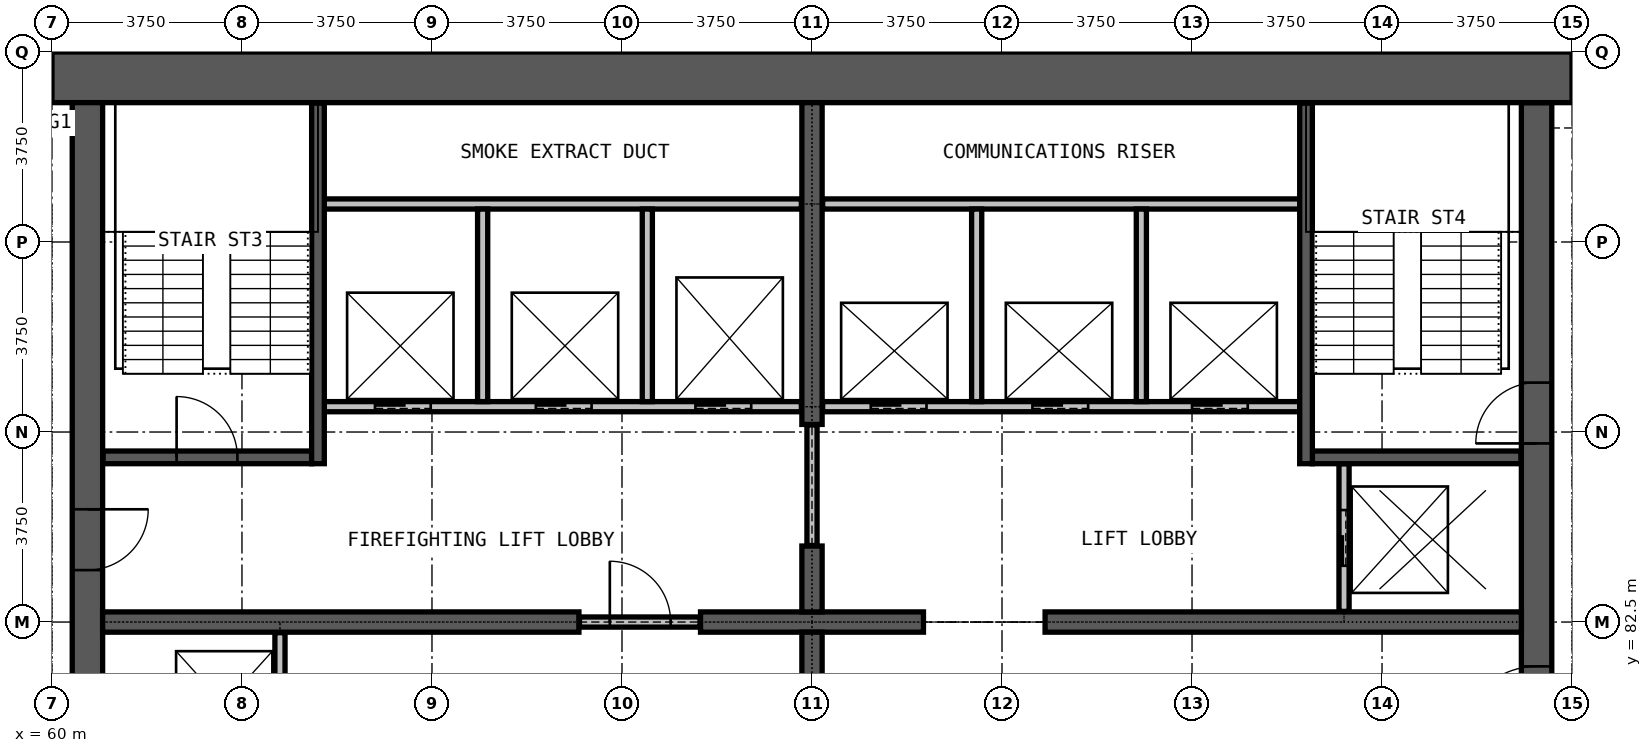
"""IFC4 building model, lengths in metres.
Left out: names, types, materials, properties, quantities, classifications, styles, units other than length and angle.
Written with IfcOpenShell. Run it as: python <this file> out.ifc"""

import sys

from ifc_helpers import new_model, si_unit, direction, frame, frame_2d, origin, place, context, subcontext, project, spatial, rectangle, extrude, element, fill, save


model = new_model("IFC4")
c1 = context("Model", 3, precision=1e-05, world=origin(), true_north=direction((0.0, 1.0)))
c2 = subcontext(c1, "Body", "Model", "MODEL_VIEW")
j1 = project(units=[si_unit("LENGTHUNIT", "METRE"), si_unit("PLANEANGLEUNIT", "RADIAN")], contexts=[c1])
p1 = place(None, origin())
s1 = spatial("IfcSite", under=j1, at=p1, CompositionType="ELEMENT")
p2 = place(p1, origin())
s2 = spatial("IfcBuilding", under=s1, at=p2, CompositionType="ELEMENT")
p3 = place(p2, frame((0.0, 0.0, 224.7)))
s3 = spatial("IfcBuildingStorey", under=s2, at=p3, CompositionType="ELEMENT", Elevation=224.7)
p4 = place(p3, frame((89.3, 72.25, 0.0), z_axis=(0.0, 0.0, 1.0), x_axis=(0.0, 1.0, 0.0)))
e1 = element("IfcWall", 1, at=p4, inside=s3, PredefinedType="SHEAR", context=c2, shape_type="SweptSolid", body=[
    extrude(rectangle(XDim=20.5, YDim=0.6, at=frame_2d((10.25, 0.0))), origin(), (0.0, 0.0, 1.0), 3.6),
])
p5 = place(p4, frame((0.275, 0.0, 0.0)))
e2 = element("IfcOpeningElement", 2, at=p5, cuts=e1, PredefinedType="OPENING", context=c2, shape_type="SweptSolid", body=[
    extrude(rectangle(XDim=1.2, YDim=2.2, at=frame_2d((0.6, 1.1))), frame((0.0, 0.31, 0.0), z_axis=(0.0, -1.0, 0.0), x_axis=(1.0, 0.0, 0.0)), (0.0, 0.0, 1.0), 0.62),
])
p6 = place(p4, frame((13.775, 0.0, 0.0)))
e3 = element("IfcOpeningElement", 3, at=p6, cuts=e1, PredefinedType="OPENING", context=c2, shape_type="SweptSolid", body=[
    extrude(rectangle(XDim=1.2, YDim=2.2, at=frame_2d((0.6, 1.1))), frame((0.0, 0.31, 0.0), z_axis=(0.0, -1.0, 0.0), x_axis=(1.0, 0.0, 0.0)), (0.0, 0.0, 1.0), 0.62),
])
p7 = place(p4, frame((7.875, 0.0, 0.0)))
e4 = element("IfcOpeningElement", 4, at=p7, cuts=e1, PredefinedType="OPENING", context=c2, shape_type="SweptSolid", body=[
    extrude(rectangle(XDim=1.5, YDim=2.2, at=frame_2d((0.75, 1.1))), frame((0.0, 0.31, 0.0), z_axis=(0.0, -1.0, 0.0), x_axis=(1.0, 0.0, 0.0)), (0.0, 0.0, 1.0), 0.62),
])
p8 = place(p3, frame((90.0, 93.25, 0.0), z_axis=(0.0, 0.0, 1.0), x_axis=(-1.0, 0.0, 0.0)))
e5 = element("IfcWall", 5, at=p8, inside=s3, PredefinedType="SHEAR", context=c2, shape_type="SweptSolid", body=[
    extrude(rectangle(XDim=30.0, YDim=1.0, at=frame_2d((15.0, 0.0))), origin(), (0.0, 0.0, 1.0), 3.6),
])
p9 = place(p3, frame((60.7, 92.75, 0.0), z_axis=(0.0, 0.0, 1.0), x_axis=(0.0, -1.0, 0.0)))
e6 = element("IfcWall", 6, at=p9, inside=s3, PredefinedType="SHEAR", context=c2, shape_type="SweptSolid", body=[
    extrude(rectangle(XDim=20.5, YDim=0.6, at=frame_2d((10.25, 0.0))), origin(), (0.0, 0.0, 1.0), 3.6),
])
p10 = place(p9, frame((19.025, 0.0, 0.0)))
e7 = element("IfcOpeningElement", 7, at=p10, cuts=e6, PredefinedType="OPENING", context=c2, shape_type="SweptSolid", body=[
    extrude(rectangle(XDim=1.2, YDim=2.2, at=frame_2d((0.6, 1.1))), frame((0.0, 0.31, 0.0), z_axis=(0.0, -1.0, 0.0), x_axis=(1.0, 0.0, 0.0)), (0.0, 0.0, 1.0), 0.62),
])
p11 = place(p9, frame((8.025, 0.0, 0.0)))
e8 = element("IfcOpeningElement", 8, at=p11, cuts=e6, PredefinedType="OPENING", context=c2, shape_type="SweptSolid", body=[
    extrude(rectangle(XDim=1.2, YDim=2.2, at=frame_2d((0.6, 1.1))), frame((0.0, 0.31, 0.0), z_axis=(0.0, -1.0, 0.0), x_axis=(1.0, 0.0, 0.0)), (0.0, 0.0, 1.0), 0.62),
])
p12 = place(p3, frame((61.0, 82.5, 0.0), z_axis=(0.0, 0.0, 1.0), x_axis=(1.0, 0.0, 0.0)))
e9 = element("IfcWall", 9, at=p12, inside=s3, PredefinedType="SHEAR", context=c2, shape_type="SweptSolid", body=[
    extrude(rectangle(XDim=9.4, YDim=0.4, at=frame_2d((4.7, 0.0))), origin(), (0.0, 0.0, 1.0), 3.6),
])
p13 = place(p3, frame((72.8, 82.5, 0.0), z_axis=(0.0, 0.0, 1.0), x_axis=(1.0, 0.0, 0.0)))
e10 = element("IfcWall", 10, at=p13, inside=s3, PredefinedType="SHEAR", context=c2, shape_type="SweptSolid", body=[
    extrude(rectangle(XDim=4.4, YDim=0.4, at=frame_2d((2.2, 0.0))), origin(), (0.0, 0.0, 1.0), 3.6),
])
p14 = place(p3, frame((79.6, 82.5, 0.0), z_axis=(0.0, 0.0, 1.0), x_axis=(1.0, 0.0, 0.0)))
e11 = element("IfcWall", 11, at=p14, inside=s3, PredefinedType="SHEAR", context=c2, shape_type="SweptSolid", body=[
    extrude(rectangle(XDim=9.4, YDim=0.4, at=frame_2d((4.7, 0.0))), origin(), (0.0, 0.0, 1.0), 3.6),
])
for number, where, z_axis, x_axis in (
    (12, (75.0, 81.0, 0.0), (0.0, 0.0, 1.0), (0.0, 1.0, 0.0)),
    (13, (75.0, 82.7, 0.0), (0.0, 0.0, 1.0), (0.0, 1.0, 0.0)),
):
    element("IfcWall", number, at=place(p3, frame(where, z_axis=z_axis, x_axis=x_axis)), inside=s3, PredefinedType="SHEAR", context=c2, shape_type="SweptSolid", body=[
        extrude(rectangle(XDim=1.3, YDim=0.4, at=frame_2d((0.65, 0.0))), origin(), (0.0, 0.0, 1.0), 3.6),
    ])
p15 = place(p3, frame((75.0, 86.4, 0.0), z_axis=(0.0, 0.0, 1.0), x_axis=(0.0, 1.0, 0.0)))
e14 = element("IfcWall", 14, at=p15, inside=s3, PredefinedType="SHEAR", context=c2, shape_type="SweptSolid", body=[
    extrude(rectangle(XDim=6.35, YDim=0.4, at=frame_2d((3.175, 0.0))), origin(), (0.0, 0.0, 1.0), 3.6),
])
p16 = place(p3, frame((70.41, 82.5, 0.0), z_axis=(0.0, 0.0, 1.0), x_axis=(1.0, 0.0, 0.0)))
e15 = element("IfcWall", 15, at=p16, inside=s3, PredefinedType="PARTITIONING", context=c2, shape_type="SweptSolid", body=[
    extrude(rectangle(XDim=2.38, YDim=0.2, at=frame_2d((1.19, 0.0))), origin(), (0.0, 0.0, 1.0), 2.4),
])
p17 = place(p16, frame((0.6, 0.0, 0.0)))
e16 = element("IfcOpeningElement", 16, at=p17, cuts=e15, PredefinedType="OPENING", context=c2, shape_type="SweptSolid", body=[
    extrude(rectangle(XDim=1.2, YDim=2.2, at=frame_2d((0.6, 1.1))), frame((0.0, 0.11, 0.0), z_axis=(0.0, -1.0, 0.0), x_axis=(1.0, 0.0, 0.0)), (0.0, 0.0, 1.0), 0.22),
])
p18 = place(p3, frame((75.0, 84.01, 0.0), z_axis=(0.0, 0.0, 1.0), x_axis=(0.0, 1.0, 0.0)))
e17 = element("IfcWall", 17, at=p18, inside=s3, PredefinedType="PARTITIONING", context=c2, shape_type="SweptSolid", body=[
    extrude(rectangle(XDim=2.38, YDim=0.2, at=frame_2d((1.19, 0.0))), origin(), (0.0, 0.0, 1.0), 2.4),
])
p19 = place(p3, frame((65.375, 86.75, 0.0), z_axis=(0.0, 0.0, 1.0), x_axis=(1.0, 0.0, 0.0)))
e18 = element("IfcWall", 18, at=p19, inside=s3, PredefinedType="PARTITIONING", context=c2, shape_type="SweptSolid", body=[
    extrude(rectangle(XDim=9.415, YDim=0.2, at=frame_2d((4.708, 0.0))), origin(), (0.0, 0.0, 1.0), 3.3),
])
p20 = place(p19, frame((1.0, 0.0, 0.0)))
e19 = element("IfcOpeningElement", 19, at=p20, cuts=e18, PredefinedType="OPENING", context=c2, shape_type="SweptSolid", body=[
    extrude(rectangle(XDim=1.1, YDim=2.2, at=frame_2d((0.55, 1.1))), frame((0.0, 0.11, 0.0), z_axis=(0.0, -1.0, 0.0), x_axis=(1.0, 0.0, 0.0)), (0.0, 0.0, 1.0), 0.22),
])
p21 = place(p19, frame((4.175, 0.0, 0.0)))
e20 = element("IfcOpeningElement", 20, at=p21, cuts=e18, PredefinedType="OPENING", context=c2, shape_type="SweptSolid", body=[
    extrude(rectangle(XDim=1.1, YDim=2.2, at=frame_2d((0.55, 1.1))), frame((0.0, 0.11, 0.0), z_axis=(0.0, -1.0, 0.0), x_axis=(1.0, 0.0, 0.0)), (0.0, 0.0, 1.0), 0.22),
])
p22 = place(p19, frame((7.325, 0.0, 0.0)))
e21 = element("IfcOpeningElement", 21, at=p22, cuts=e18, PredefinedType="OPENING", context=c2, shape_type="SweptSolid", body=[
    extrude(rectangle(XDim=1.1, YDim=2.2, at=frame_2d((0.55, 1.1))), frame((0.0, 0.11, 0.0), z_axis=(0.0, -1.0, 0.0), x_axis=(1.0, 0.0, 0.0)), (0.0, 0.0, 1.0), 0.22),
])
p23 = place(p3, frame((75.21, 86.75, 0.0), z_axis=(0.0, 0.0, 1.0), x_axis=(1.0, 0.0, 0.0)))
e22 = element("IfcWall", 22, at=p23, inside=s3, PredefinedType="PARTITIONING", context=c2, shape_type="SweptSolid", body=[
    extrude(rectangle(XDim=9.415, YDim=0.2, at=frame_2d((4.708, 0.0))), origin(), (0.0, 0.0, 1.0), 3.3),
])
p24 = place(p23, frame((0.95, 0.0, 0.0)))
e23 = element("IfcOpeningElement", 23, at=p24, cuts=e22, PredefinedType="OPENING", context=c2, shape_type="SweptSolid", body=[
    extrude(rectangle(XDim=1.1, YDim=2.2, at=frame_2d((0.55, 1.1))), frame((0.0, 0.11, 0.0), z_axis=(0.0, -1.0, 0.0), x_axis=(1.0, 0.0, 0.0)), (0.0, 0.0, 1.0), 0.22),
])
p25 = place(p23, frame((4.14, 0.0, 0.0)))
e24 = element("IfcOpeningElement", 24, at=p25, cuts=e22, PredefinedType="OPENING", context=c2, shape_type="SweptSolid", body=[
    extrude(rectangle(XDim=1.1, YDim=2.2, at=frame_2d((0.55, 1.1))), frame((0.0, 0.11, 0.0), z_axis=(0.0, -1.0, 0.0), x_axis=(1.0, 0.0, 0.0)), (0.0, 0.0, 1.0), 0.22),
])
p26 = place(p23, frame((7.29, 0.0, 0.0)))
e25 = element("IfcOpeningElement", 25, at=p26, cuts=e22, PredefinedType="OPENING", context=c2, shape_type="SweptSolid", body=[
    extrude(rectangle(XDim=1.1, YDim=2.2, at=frame_2d((0.55, 1.1))), frame((0.0, 0.11, 0.0), z_axis=(0.0, -1.0, 0.0), x_axis=(1.0, 0.0, 0.0)), (0.0, 0.0, 1.0), 0.22),
])
for number, where, z_axis, x_axis in (
    (26, (65.375, 90.75, 0.0), (0.0, 0.0, 1.0), (1.0, 0.0, 0.0)),
    (27, (75.21, 90.75, 0.0), (0.0, 0.0, 1.0), (1.0, 0.0, 0.0)),
):
    element("IfcWall", number, at=place(p3, frame(where, z_axis=z_axis, x_axis=x_axis)), inside=s3, PredefinedType="PARTITIONING", context=c2, shape_type="SweptSolid", body=[
        extrude(rectangle(XDim=9.415, YDim=0.2, at=frame_2d((4.708, 0.0))), origin(), (0.0, 0.0, 1.0), 3.3),
    ])
p27 = place(p3, frame((64.5, 79.375, 0.0), z_axis=(0.0, 0.0, 1.0), x_axis=(0.0, 1.0, 0.0)))
e28 = element("IfcWall", 28, at=p27, inside=s3, PredefinedType="PARTITIONING", context=c2, shape_type="SweptSolid", body=[
    extrude(rectangle(XDim=2.915, YDim=0.2, at=frame_2d((1.458, 0.0))), origin(), (0.0, 0.0, 1.0), 3.3),
])
for number, where, z_axis, x_axis in (
    (29, (68.5, 86.85, 0.0), (0.0, 0.0, 1.0), (0.0, 1.0, 0.0)),
    (30, (71.75, 86.85, 0.0), (0.0, 0.0, 1.0), (0.0, 1.0, 0.0)),
    (31, (78.25, 86.85, 0.0), (0.0, 0.0, 1.0), (0.0, 1.0, 0.0)),
    (32, (81.5, 86.85, 0.0), (0.0, 0.0, 1.0), (0.0, 1.0, 0.0)),
):
    element("IfcWall", number, at=place(p3, frame(where, z_axis=z_axis, x_axis=x_axis)), inside=s3, PredefinedType="PARTITIONING", context=c2, shape_type="SweptSolid", body=[
        extrude(rectangle(XDim=3.8, YDim=0.2, at=frame_2d((1.9, 0.0))), origin(), (0.0, 0.0, 1.0), 3.3),
    ])
p28 = place(p3, frame((85.5, 82.71, 0.0), z_axis=(0.0, 0.0, 1.0), x_axis=(0.0, 1.0, 0.0)))
e33 = element("IfcWall", 33, at=p28, inside=s3, PredefinedType="PARTITIONING", context=c2, shape_type="SweptSolid", body=[
    extrude(rectangle(XDim=2.915, YDim=0.2, at=frame_2d((1.458, 0.0))), origin(), (0.0, 0.0, 1.0), 3.3),
])
p29 = place(p28, frame((0.9, 0.0, 0.0)))
e34 = element("IfcOpeningElement", 34, at=p29, cuts=e33, PredefinedType="OPENING", context=c2, shape_type="SweptSolid", body=[
    extrude(rectangle(XDim=1.1, YDim=2.2, at=frame_2d((0.55, 1.1))), frame((0.0, 0.11, 0.0), z_axis=(0.0, -1.0, 0.0), x_axis=(1.0, 0.0, 0.0)), (0.0, 0.0, 1.0), 0.22),
])
p30 = place(p3, frame((61.01, 85.75, 0.0), z_axis=(0.0, 0.0, 1.0), x_axis=(1.0, 0.0, 0.0)))
e35 = element("IfcWall", 35, at=p30, inside=s3, PredefinedType="PARTITIONING", context=c2, shape_type="SweptSolid", body=[
    extrude(rectangle(XDim=4.115, YDim=0.25, at=frame_2d((2.058, 0.0))), origin(), (0.0, 0.0, 1.0), 3.3),
])
p31 = place(p30, frame((1.45, 0.0, 0.0)))
e36 = element("IfcOpeningElement", 36, at=p31, cuts=e35, PredefinedType="OPENING", context=c2, shape_type="SweptSolid", body=[
    extrude(rectangle(XDim=1.2, YDim=2.2, at=frame_2d((0.6, 1.1))), frame((0.0, 0.135, 0.0), z_axis=(0.0, -1.0, 0.0), x_axis=(1.0, 0.0, 0.0)), (0.0, 0.0, 1.0), 0.27),
])
p32 = place(p3, frame((84.875, 85.75, 0.0), z_axis=(0.0, 0.0, 1.0), x_axis=(1.0, 0.0, 0.0)))
e37 = element("IfcWall", 37, at=p32, inside=s3, PredefinedType="PARTITIONING", context=c2, shape_type="SweptSolid", body=[
    extrude(rectangle(XDim=4.115, YDim=0.25, at=frame_2d((2.058, 0.0))), origin(), (0.0, 0.0, 1.0), 3.3),
])
for number, where, z_axis, x_axis in (
    (38, (65.25, 85.625, 0.0), (0.0, 0.0, 1.0), (0.0, 1.0, 0.0)),
    (39, (84.75, 85.625, 0.0), (0.0, 0.0, 1.0), (0.0, 1.0, 0.0)),
):
    element("IfcWall", number, at=place(p3, frame(where, z_axis=z_axis, x_axis=x_axis)), inside=s3, PredefinedType="PARTITIONING", context=c2, shape_type="SweptSolid", body=[
        extrude(rectangle(XDim=7.115, YDim=0.25, at=frame_2d((3.558, 0.0))), origin(), (0.0, 0.0, 1.0), 3.3),
    ])
p33 = place(p24, origin())
e40 = element("IfcDoor", 40, at=p33, inside=s3, OperationType="DOUBLE_DOOR_SLIDING", PredefinedType="DOOR", context=c2, shape_type="SweptSolid", body=[
    extrude(rectangle(XDim=1.1, YDim=2.2, at=frame_2d((0.55, 1.1))), frame((0.0, 0.025, 0.0), z_axis=(0.0, -1.0, 0.0), x_axis=(1.0, 0.0, 0.0)), (0.0, 0.0, 1.0), 0.05),
])
fill(e23, e40)
p34 = place(p25, origin())
e41 = element("IfcDoor", 41, at=p34, inside=s3, OperationType="DOUBLE_DOOR_SLIDING", PredefinedType="DOOR", context=c2, shape_type="SweptSolid", body=[
    extrude(rectangle(XDim=1.1, YDim=2.2, at=frame_2d((0.55, 1.1))), frame((0.0, 0.025, 0.0), z_axis=(0.0, -1.0, 0.0), x_axis=(1.0, 0.0, 0.0)), (0.0, 0.0, 1.0), 0.05),
])
fill(e24, e41)
p35 = place(p26, origin())
e42 = element("IfcDoor", 42, at=p35, inside=s3, OperationType="DOUBLE_DOOR_SLIDING", PredefinedType="DOOR", context=c2, shape_type="SweptSolid", body=[
    extrude(rectangle(XDim=1.1, YDim=2.2, at=frame_2d((0.55, 1.1))), frame((0.0, 0.025, 0.0), z_axis=(0.0, -1.0, 0.0), x_axis=(1.0, 0.0, 0.0)), (0.0, 0.0, 1.0), 0.05),
])
fill(e25, e42)
p36 = place(p20, origin())
e43 = element("IfcDoor", 43, at=p36, inside=s3, OperationType="DOUBLE_DOOR_SLIDING", PredefinedType="DOOR", context=c2, shape_type="SweptSolid", body=[
    extrude(rectangle(XDim=1.1, YDim=2.2, at=frame_2d((0.55, 1.1))), frame((0.0, 0.025, 0.0), z_axis=(0.0, -1.0, 0.0), x_axis=(1.0, 0.0, 0.0)), (0.0, 0.0, 1.0), 0.05),
])
fill(e19, e43)
p37 = place(p21, origin())
e44 = element("IfcDoor", 44, at=p37, inside=s3, OperationType="DOUBLE_DOOR_SLIDING", PredefinedType="DOOR", context=c2, shape_type="SweptSolid", body=[
    extrude(rectangle(XDim=1.1, YDim=2.2, at=frame_2d((0.55, 1.1))), frame((0.0, 0.025, 0.0), z_axis=(0.0, -1.0, 0.0), x_axis=(1.0, 0.0, 0.0)), (0.0, 0.0, 1.0), 0.05),
])
fill(e20, e44)
p38 = place(p22, origin())
e45 = element("IfcDoor", 45, at=p38, inside=s3, OperationType="DOUBLE_DOOR_SLIDING", PredefinedType="DOOR", context=c2, shape_type="SweptSolid", body=[
    extrude(rectangle(XDim=1.1, YDim=2.2, at=frame_2d((0.55, 1.1))), frame((0.0, 0.025, 0.0), z_axis=(0.0, -1.0, 0.0), x_axis=(1.0, 0.0, 0.0)), (0.0, 0.0, 1.0), 0.05),
])
fill(e21, e45)
p39 = place(p29, origin())
e46 = element("IfcDoor", 46, at=p39, inside=s3, OperationType="DOUBLE_DOOR_SLIDING", PredefinedType="DOOR", context=c2, shape_type="SweptSolid", body=[
    extrude(rectangle(XDim=1.1, YDim=2.2, at=frame_2d((0.55, 1.1))), frame((0.0, 0.025, 0.0), z_axis=(0.0, -1.0, 0.0), x_axis=(1.0, 0.0, 0.0)), (0.0, 0.0, 1.0), 0.05),
])
fill(e34, e46)
p40 = place(p17, origin())
e47 = element("IfcDoor", 47, at=p40, inside=s3, OperationType="SINGLE_SWING_LEFT", PredefinedType="DOOR", context=c2, shape_type="SweptSolid", body=[
    extrude(rectangle(XDim=1.2, YDim=2.2, at=frame_2d((0.6, 1.1))), frame((0.0, 0.025, 0.0), z_axis=(0.0, -1.0, 0.0), x_axis=(1.0, 0.0, 0.0)), (0.0, 0.0, 1.0), 0.05),
])
fill(e16, e47)
p41 = place(p31, origin())
e48 = element("IfcDoor", 48, at=p41, inside=s3, OperationType="SINGLE_SWING_LEFT", PredefinedType="DOOR", context=c2, shape_type="SweptSolid", body=[
    extrude(rectangle(XDim=1.2, YDim=2.2, at=frame_2d((0.6, 1.1))), frame((0.0, 0.025, 0.0), z_axis=(0.0, -1.0, 0.0), x_axis=(1.0, 0.0, 0.0)), (0.0, 0.0, 1.0), 0.05),
])
fill(e36, e48)
p42 = place(p6, origin())
e49 = element("IfcDoor", 49, at=p42, inside=s3, OperationType="SINGLE_SWING_LEFT", PredefinedType="DOOR", context=c2, shape_type="SweptSolid", body=[
    extrude(rectangle(XDim=1.2, YDim=2.2, at=frame_2d((0.6, 1.1))), frame((0.0, 0.025, 0.0), z_axis=(0.0, -1.0, 0.0), x_axis=(1.0, 0.0, 0.0)), (0.0, 0.0, 1.0), 0.05),
])
fill(e3, e49)
p43 = place(p7, origin())
e50 = element("IfcDoor", 50, at=p43, inside=s3, OperationType="DOUBLE_DOOR_SINGLE_SWING", PredefinedType="DOOR", context=c2, shape_type="SweptSolid", body=[
    extrude(rectangle(XDim=1.5, YDim=2.2, at=frame_2d((0.75, 1.1))), frame((0.0, 0.025, 0.0), z_axis=(0.0, -1.0, 0.0), x_axis=(1.0, 0.0, 0.0)), (0.0, 0.0, 1.0), 0.05),
])
fill(e4, e50)
p44 = place(p11, origin())
e51 = element("IfcDoor", 51, at=p44, inside=s3, OperationType="SINGLE_SWING_LEFT", PredefinedType="DOOR", context=c2, shape_type="SweptSolid", body=[
    extrude(rectangle(XDim=1.2, YDim=2.2, at=frame_2d((0.6, 1.1))), frame((0.0, 0.025, 0.0), z_axis=(0.0, -1.0, 0.0), x_axis=(1.0, 0.0, 0.0)), (0.0, 0.0, 1.0), 0.05),
])
fill(e8, e51)
save(model, sys.argv[1])
